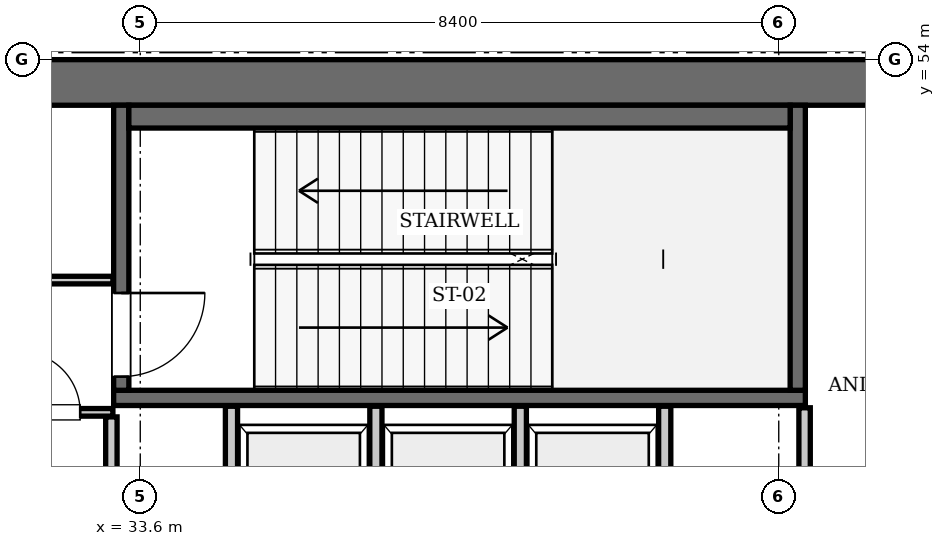
"""IFC4 building model, lengths in metres.
Left out: names, types, materials, properties, quantities, classifications, styles, units other than length and angle.
Written with IfcOpenShell. Run it as: python <this file> out.ifc"""

import sys

from ifc_helpers import new_model, si_unit, direction, frame, frame_2d, origin, place, context, subcontext, project, spatial, rectangle, extrude, element, fill, save


model = new_model("IFC4")
c1 = context("Model", 3, precision=1e-05, world=origin(), true_north=direction((0.0, 1.0)))
c2 = subcontext(c1, "Body", "Model", "MODEL_VIEW")
j1 = project(units=[si_unit("LENGTHUNIT", "METRE"), si_unit("PLANEANGLEUNIT", "RADIAN")], contexts=[c1])
p1 = place(None, origin())
s1 = spatial("IfcSite", under=j1, at=p1, CompositionType="ELEMENT")
p2 = place(p1, origin())
s2 = spatial("IfcBuilding", under=s1, at=p2, CompositionType="ELEMENT")
p3 = place(p2, frame((0.0, 0.0, 359.1)))
s3 = spatial("IfcBuildingStorey", under=s2, at=p3, CompositionType="ELEMENT", Elevation=359.1)
p4 = place(p3, frame((25.2, 53.7, 0.0), z_axis=(0.0, 0.0, 1.0), x_axis=(1.0, 0.0, 0.0)))
e1 = element("IfcWall", 1, at=p4, inside=s3, PredefinedType="SHEAR", context=c2, shape_type="SweptSolid", body=[
    extrude(rectangle(XDim=25.2, YDim=0.6, at=frame_2d((12.6, 0.0))), origin(), (0.0, 0.0, 1.0), 5.25),
])
p5 = place(p3, frame((33.25, 49.55, 0.0), z_axis=(0.0, 0.0, 1.0), x_axis=(1.0, 0.0, 0.0)))
e2 = element("IfcWall", 2, at=p5, inside=s3, PredefinedType="SOLIDWALL", context=c2, shape_type="SweptSolid", body=[
    extrude(rectangle(XDim=9.1, YDim=0.2, at=frame_2d((4.55, 0.0))), origin(), (0.0, 0.0, 1.0), 4.97),
])
p6 = place(p3, frame((42.25, 49.65, 0.0), z_axis=(0.0, 0.0, 1.0), x_axis=(0.0, 1.0, 0.0)))
e3 = element("IfcWall", 3, at=p6, inside=s3, PredefinedType="SOLIDWALL", context=c2, shape_type="SweptSolid", body=[
    extrude(rectangle(XDim=3.75, YDim=0.2, at=frame_2d((1.875, 0.0))), origin(), (0.0, 0.0, 1.0), 4.97),
])
p7 = place(p3, frame((33.35, 49.65, 0.0), z_axis=(0.0, 0.0, 1.0), x_axis=(0.0, 1.0, 0.0)))
e4 = element("IfcWall", 4, at=p7, inside=s3, PredefinedType="SOLIDWALL", context=c2, shape_type="SweptSolid", body=[
    extrude(rectangle(XDim=3.75, YDim=0.2, at=frame_2d((1.875, 0.0))), origin(), (0.0, 0.0, 1.0), 4.97),
])
p8 = place(p7, frame((0.18, 0.0, 0.0)))
e5 = element("IfcOpeningElement", 5, at=p8, cuts=e4, PredefinedType="OPENING", context=c2, shape_type="SweptSolid", body=[
    extrude(rectangle(XDim=1.1, YDim=2.15, at=frame_2d((0.55, 1.075))), frame((0.0, 0.11, 0.0), z_axis=(0.0, -1.0, 0.0), x_axis=(1.0, 0.0, 0.0)), (0.0, 0.0, 1.0), 0.22),
])
p9 = place(p3, frame((33.45, 53.25, 0.0), z_axis=(0.0, 0.0, 1.0), x_axis=(1.0, 0.0, 0.0)))
e6 = element("IfcWall", 6, at=p9, inside=s3, PredefinedType="SOLIDWALL", context=c2, shape_type="SweptSolid", body=[
    extrude(rectangle(XDim=8.7, YDim=0.3, at=frame_2d((4.35, 0.0))), origin(), (0.0, 0.0, 1.0), 4.97),
])
for number, where, z_axis, x_axis in (
    (7, (34.8, 47.25, 0.0), (0.0, 0.0, 1.0), (0.0, 1.0, 0.0)),
    (8, (36.7, 47.25, 0.0), (0.0, 0.0, 1.0), (0.0, 1.0, 0.0)),
    (9, (38.6, 47.25, 0.0), (0.0, 0.0, 1.0), (0.0, 1.0, 0.0)),
    (10, (40.5, 47.25, 0.0), (0.0, 0.0, 1.0), (0.0, 1.0, 0.0)),
):
    element("IfcWall", number, at=place(p3, frame(where, z_axis=z_axis, x_axis=x_axis)), inside=s3, PredefinedType="SOLIDWALL", context=c2, shape_type="SweptSolid", body=[
        extrude(rectangle(XDim=2.19, YDim=0.16, at=frame_2d((1.095, 0.0))), origin(), (0.0, 0.0, 1.0), 4.97),
    ])
p10 = place(p3, frame((33.22, 45.14, 0.0), z_axis=(0.0, 0.0, 1.0), x_axis=(0.0, 1.0, 0.0)))
e11 = element("IfcWall", 11, at=p10, inside=s3, PredefinedType="PARTITIONING", context=c2, shape_type="SweptSolid", body=[
    extrude(rectangle(XDim=4.16, YDim=0.15, at=frame_2d((2.08, 0.0))), origin(), (0.0, 0.0, 1.0), 4.97),
])
p11 = place(p3, frame((30.06, 49.36, 0.0), z_axis=(0.0, 0.0, 1.0), x_axis=(1.0, 0.0, 0.0)))
e12 = element("IfcWall", 12, at=p11, inside=s3, PredefinedType="PARTITIONING", context=c2, shape_type="SweptSolid", body=[
    extrude(rectangle(XDim=3.18, YDim=0.1, at=frame_2d((1.59, 0.0))), origin(), (0.0, 0.0, 1.0), 4.97),
])
p12 = place(p11, frame((1.95, 0.0, 0.0)))
e13 = element("IfcOpeningElement", 13, at=p12, cuts=e12, PredefinedType="OPENING", context=c2, shape_type="SweptSolid", body=[
    extrude(rectangle(XDim=0.8, YDim=2.05, at=frame_2d((0.4, 1.025))), frame((0.0, 0.06, 0.0), z_axis=(0.0, -1.0, 0.0), x_axis=(1.0, 0.0, 0.0)), (0.0, 0.0, 1.0), 0.12),
])
p13 = place(p3, frame((31.82, 51.1, 0.0), z_axis=(0.0, 0.0, 1.0), x_axis=(1.0, 0.0, 0.0)))
e14 = element("IfcWall", 14, at=p13, inside=s3, PredefinedType="PARTITIONING", context=c2, shape_type="SweptSolid", body=[
    extrude(rectangle(XDim=1.42, YDim=0.1, at=frame_2d((0.71, 0.0))), origin(), (0.0, 0.0, 1.0), 4.97),
])
p14 = place(p3, frame((42.34, 46.96, 0.0), z_axis=(0.0, 0.0, 1.0), x_axis=(0.0, 1.0, 0.0)))
e15 = element("IfcWall", 15, at=p14, inside=s3, PredefinedType="PARTITIONING", context=c2, shape_type="SweptSolid", body=[
    extrude(rectangle(XDim=2.46, YDim=0.15, at=frame_2d((1.23, 0.0))), origin(), (0.0, 0.0, 1.0), 4.97),
])
p15 = place(p14, frame((0.24, 0.0, 0.0)))
e16 = element("IfcOpeningElement", 16, at=p15, cuts=e15, PredefinedType="OPENING", context=c2, shape_type="SweptSolid", body=[
    extrude(rectangle(XDim=0.8, YDim=2.05, at=frame_2d((0.4, 1.025))), frame((0.0, 0.085, 0.0), z_axis=(0.0, -1.0, 0.0), x_axis=(1.0, 0.0, 0.0)), (0.0, 0.0, 1.0), 0.17),
])
p16 = place(p8, frame((1.1, 0.0, 0.0), z_axis=(0.0, 0.0, 1.0), x_axis=(-1.0, 0.0, 0.0)))
e17 = element("IfcDoor", 17, at=p16, inside=s3, OperationType="SINGLE_SWING_LEFT", PredefinedType="DOOR", context=c2, shape_type="SweptSolid", body=[
    extrude(rectangle(XDim=1.1, YDim=2.15, at=frame_2d((0.55, 1.075))), frame((0.0, 0.025, 0.0), z_axis=(0.0, -1.0, 0.0), x_axis=(1.0, 0.0, 0.0)), (0.0, 0.0, 1.0), 0.05),
])
fill(e5, e17)
p17 = place(p12, origin())
e18 = element("IfcDoor", 18, at=p17, inside=s3, OperationType="SINGLE_SWING_LEFT", PredefinedType="DOOR", context=c2, shape_type="SweptSolid", body=[
    extrude(rectangle(XDim=0.8, YDim=2.05, at=frame_2d((0.4, 1.025))), frame((0.0, 0.025, 0.0), z_axis=(0.0, -1.0, 0.0), x_axis=(1.0, 0.0, 0.0)), (0.0, 0.0, 1.0), 0.05),
])
fill(e13, e18)
save(model, sys.argv[1])
